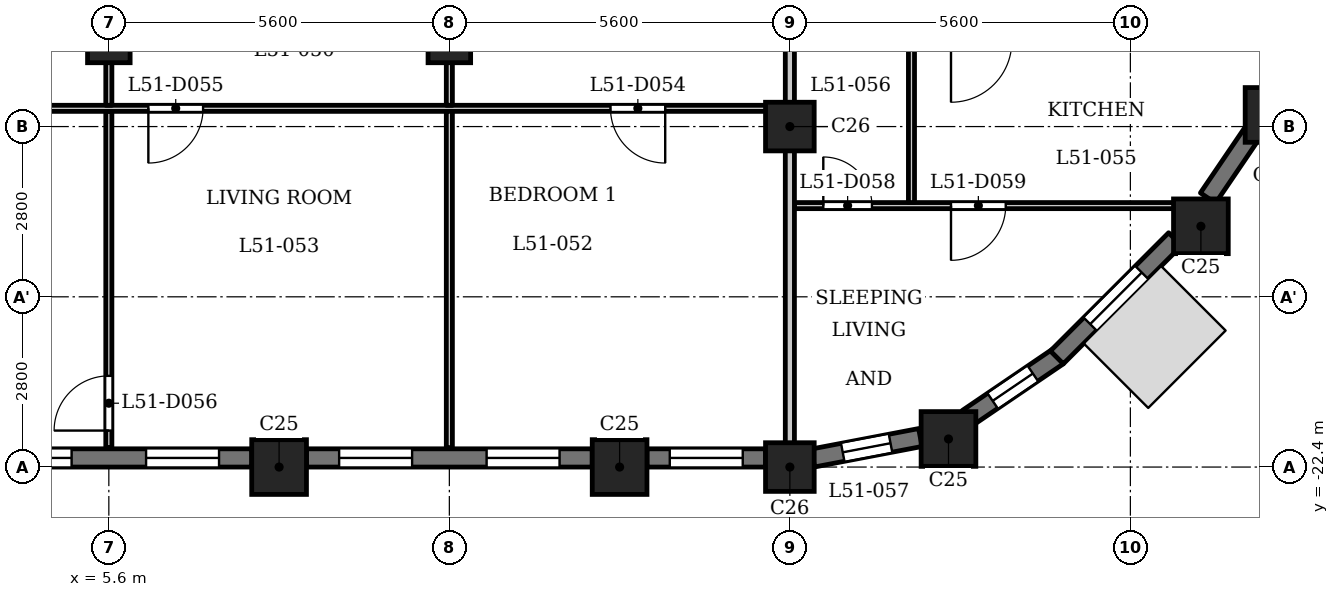
"""IFC4 building model, lengths in metres.
Left out: names, types, materials, properties, quantities, classifications, styles, units other than length and angle.
Written with IfcOpenShell. Run it as: python <this file> out.ifc"""

import sys

from ifc_helpers import new_model, si_unit, direction, frame, frame_2d, origin, origin_2d, place, context, subcontext, project, spatial, rectangle, extrude, element, fill, save


model = new_model("IFC4")
c1 = context("Model", 3, precision=1e-05, world=origin(), true_north=direction((0.0, 1.0)))
c2 = subcontext(c1, "Body", "Model", "MODEL_VIEW")
j1 = project(units=[si_unit("LENGTHUNIT", "METRE"), si_unit("PLANEANGLEUNIT", "RADIAN")], contexts=[c1])
p1 = place(None, origin())
s1 = spatial("IfcSite", under=j1, at=p1, CompositionType="ELEMENT")
p2 = place(p1, origin())
s2 = spatial("IfcBuilding", under=s1, at=p2, CompositionType="ELEMENT")
p3 = place(p2, frame((0.0, 0.0, 199.4)))
s3 = spatial("IfcBuildingStorey", under=s2, at=p3, CompositionType="ELEMENT", Elevation=199.4)
for number, where, z_axis, x_axis in (
    (1, (8.4, -22.4, 0.0), (0.0, 0.0, 1.0), (1.0, 0.0, 0.0)),
    (2, (14.0, -22.4, 0.0), (0.0, 0.0, 1.0), (1.0, 0.0, 0.0)),
    (3, (19.409, -21.938, 0.0), (0.0, 0.0, 1.0), (1.0, 0.0, 0.0)),
    (4, (23.56, -18.44, 0.0), (0.0, 0.0, 1.0), (1.0, 0.0, 0.0)),
    (5, (24.738, -16.609, 0.0), (0.0, 0.0, 1.0), (1.0, 0.0, 0.0)),
):
    element("IfcColumn", number, at=place(p3, frame(where, z_axis=z_axis, x_axis=x_axis)), inside=s3, PredefinedType="COLUMN", context=c2, shape_type="SweptSolid", body=[
        extrude(rectangle(XDim=0.9, YDim=0.9, at=origin_2d()), origin(), (0.0, 0.0, 1.0), 3.5),
    ])
for number, where, z_axis, x_axis in (
    (6, (16.8, -22.4, 0.0), (0.0, 0.0, 1.0), (1.0, 0.0, 0.0)),
    (7, (16.8, -16.8, 0.0), (0.0, 0.0, 1.0), (1.0, 0.0, 0.0)),
):
    element("IfcColumn", number, at=place(p3, frame(where, z_axis=z_axis, x_axis=x_axis)), inside=s3, PredefinedType="COLUMN", context=c2, shape_type="SweptSolid", body=[
        extrude(rectangle(XDim=0.8, YDim=0.8, at=origin_2d()), origin(), (0.0, 0.0, 1.0), 3.5),
    ])
for number, where, z_axis, x_axis in (
    (8, (5.6, -15.4, 0.0), (0.0, 0.0, 1.0), (1.0, 0.0, 0.0)),
    (9, (11.2, -15.4, 0.0), (0.0, 0.0, 1.0), (1.0, 0.0, 0.0)),
):
    element("IfcColumn", number, at=place(p3, frame(where, z_axis=z_axis, x_axis=x_axis)), inside=s3, PredefinedType="COLUMN", context=c2, shape_type="SweptSolid", body=[
        extrude(rectangle(XDim=0.7, YDim=0.7, at=origin_2d()), origin(), (0.0, 0.0, 1.0), 3.5),
    ])
p4 = place(p3, frame((3.25, -22.25, 0.0), z_axis=(0.0, 0.0, 1.0), x_axis=(1.0, 0.0, 0.0)))
e10 = element("IfcWall", 10, at=p4, inside=s3, PredefinedType="SOLIDWALL", context=c2, shape_type="SweptSolid", body=[
    extrude(rectangle(XDim=4.7, YDim=0.3, at=frame_2d((2.35, 0.0))), origin(), (0.0, 0.0, 1.0), 2.5),
])
p5 = place(p4, frame((0.538, 0.0, 0.6)))
e11 = element("IfcOpeningElement", 11, at=p5, cuts=e10, PredefinedType="OPENING", context=c2, shape_type="SweptSolid", body=[
    extrude(rectangle(XDim=1.2, YDim=1.55, at=frame_2d((0.6, 0.775))), frame((0.0, 0.16, 0.0), z_axis=(0.0, -1.0, 0.0), x_axis=(1.0, 0.0, 0.0)), (0.0, 0.0, 1.0), 0.32),
])
p6 = place(p4, frame((2.962, 0.0, 0.6)))
e12 = element("IfcOpeningElement", 12, at=p6, cuts=e10, PredefinedType="OPENING", context=c2, shape_type="SweptSolid", body=[
    extrude(rectangle(XDim=1.2, YDim=1.55, at=frame_2d((0.6, 0.775))), frame((0.0, 0.16, 0.0), z_axis=(0.0, -1.0, 0.0), x_axis=(1.0, 0.0, 0.0)), (0.0, 0.0, 1.0), 0.32),
])
p7 = place(p3, frame((8.85, -22.25, 0.0), z_axis=(0.0, 0.0, 1.0), x_axis=(1.0, 0.0, 0.0)))
e13 = element("IfcWall", 13, at=p7, inside=s3, PredefinedType="SOLIDWALL", context=c2, shape_type="SweptSolid", body=[
    extrude(rectangle(XDim=4.7, YDim=0.3, at=frame_2d((2.35, 0.0))), origin(), (0.0, 0.0, 1.0), 2.5),
])
p8 = place(p7, frame((0.538, 0.0, 0.6)))
e14 = element("IfcOpeningElement", 14, at=p8, cuts=e13, PredefinedType="OPENING", context=c2, shape_type="SweptSolid", body=[
    extrude(rectangle(XDim=1.2, YDim=1.55, at=frame_2d((0.6, 0.775))), frame((0.0, 0.16, 0.0), z_axis=(0.0, -1.0, 0.0), x_axis=(1.0, 0.0, 0.0)), (0.0, 0.0, 1.0), 0.32),
])
p9 = place(p7, frame((2.962, 0.0, 0.6)))
e15 = element("IfcOpeningElement", 15, at=p9, cuts=e13, PredefinedType="OPENING", context=c2, shape_type="SweptSolid", body=[
    extrude(rectangle(XDim=1.2, YDim=1.55, at=frame_2d((0.6, 0.775))), frame((0.0, 0.16, 0.0), z_axis=(0.0, -1.0, 0.0), x_axis=(1.0, 0.0, 0.0)), (0.0, 0.0, 1.0), 0.32),
])
p10 = place(p3, frame((14.45, -22.25, 0.0), z_axis=(0.0, 0.0, 1.0), x_axis=(1.0, 0.0, 0.0)))
e16 = element("IfcWall", 16, at=p10, inside=s3, PredefinedType="SOLIDWALL", context=c2, shape_type="SweptSolid", body=[
    extrude(rectangle(XDim=1.95, YDim=0.3, at=frame_2d((0.975, 0.0))), origin(), (0.0, 0.0, 1.0), 2.5),
])
p11 = place(p10, frame((0.375, 0.0, 0.6)))
e17 = element("IfcOpeningElement", 17, at=p11, cuts=e16, PredefinedType="OPENING", context=c2, shape_type="SweptSolid", body=[
    extrude(rectangle(XDim=1.2, YDim=1.55, at=frame_2d((0.6, 0.775))), frame((0.0, 0.16, 0.0), z_axis=(0.0, -1.0, 0.0), x_axis=(1.0, 0.0, 0.0)), (0.0, 0.0, 1.0), 0.32),
])
p12 = place(p3, frame((17.179, -22.251, 0.0), z_axis=(0.0, 0.0, 1.0), x_axis=(0.98230529033, 0.187286722942, 0.0)))
e18 = element("IfcWall", 18, at=p12, inside=s3, PredefinedType="SOLIDWALL", context=c2, shape_type="SweptSolid", body=[
    extrude(rectangle(XDim=1.799, YDim=0.3, at=frame_2d((0.899, 0.0))), origin(), (0.0, 0.0, 1.0), 2.5),
])
p13 = place(p12, frame((0.5, 0.0, 0.6)))
e19 = element("IfcOpeningElement", 19, at=p13, cuts=e18, PredefinedType="OPENING", context=c2, shape_type="SweptSolid", body=[
    extrude(rectangle(XDim=0.8, YDim=1.55, at=frame_2d((0.4, 0.775))), frame((0.0, 0.16, 0.0), z_axis=(0.0, -1.0, 0.0), x_axis=(1.0, 0.0, 0.0)), (0.0, 0.0, 1.0), 0.32),
])
p14 = place(p3, frame((19.719, -21.594, 0.0), z_axis=(0.0, 0.0, 1.0), x_axis=(0.827067282455, 0.562102935673, 0.0)))
e20 = element("IfcWall", 20, at=p14, inside=s3, PredefinedType="SOLIDWALL", context=c2, shape_type="SweptSolid", body=[
    extrude(rectangle(XDim=1.806, YDim=0.3, at=frame_2d((0.903, 0.0))), origin(), (0.0, 0.0, 1.0), 2.5),
])
p15 = place(p14, frame((0.503, 0.0, 0.6)))
e21 = element("IfcOpeningElement", 21, at=p15, cuts=e20, PredefinedType="OPENING", context=c2, shape_type="SweptSolid", body=[
    extrude(rectangle(XDim=0.8, YDim=1.55, at=frame_2d((0.4, 0.775))), frame((0.0, 0.16, 0.0), z_axis=(0.0, -1.0, 0.0), x_axis=(1.0, 0.0, 0.0)), (0.0, 0.0, 1.0), 0.32),
])
p16 = place(p3, frame((21.191, -20.597, 0.0), z_axis=(0.0, 0.0, 1.0), x_axis=(0.707106781187, 0.707106781187, 0.0)))
e22 = element("IfcWall", 22, at=p16, inside=s3, PredefinedType="SOLIDWALL", context=c2, shape_type="SweptSolid", body=[
    extrude(rectangle(XDim=2.75, YDim=0.3, at=frame_2d((1.375, 0.0))), origin(), (0.0, 0.0, 1.0), 2.5),
])
p17 = place(p16, frame((0.775, 0.0, 0.6)))
e23 = element("IfcOpeningElement", 23, at=p17, cuts=e22, PredefinedType="OPENING", context=c2, shape_type="SweptSolid", body=[
    extrude(rectangle(XDim=1.2, YDim=1.55, at=frame_2d((0.6, 0.775))), frame((0.0, 0.16, 0.0), z_axis=(0.0, -1.0, 0.0), x_axis=(1.0, 0.0, 0.0)), (0.0, 0.0, 1.0), 0.32),
])
p18 = place(p3, frame((23.676, -17.975, 0.0), z_axis=(0.0, 0.0, 1.0), x_axis=(0.56200149592, 0.827136215253, 0.0)))
e24 = element("IfcWall", 24, at=p18, inside=s3, PredefinedType="SOLIDWALL", context=c2, shape_type="SweptSolid", body=[
    extrude(rectangle(XDim=1.277, YDim=0.3, at=frame_2d((0.639, 0.0))), origin(), (0.0, 0.0, 1.0), 2.5),
])
p19 = place(p3, frame((16.875, -18.1, 0.0), z_axis=(0.0, 0.0, 1.0), x_axis=(1.0, 0.0, 0.0)))
e25 = element("IfcWall", 25, at=p19, inside=s3, PredefinedType="PARTITIONING", context=c2, shape_type="SweptSolid", body=[
    extrude(rectangle(XDim=6.765, YDim=0.1, at=frame_2d((3.382, 0.0))), origin(), (0.0, 0.0, 1.0), 3.2),
])
p20 = place(p19, frame((0.475, 0.0, 0.0)))
e26 = element("IfcOpeningElement", 26, at=p20, cuts=e25, PredefinedType="OPENING", context=c2, shape_type="SweptSolid", body=[
    extrude(rectangle(XDim=0.8, YDim=2.1, at=frame_2d((0.4, 1.05))), frame((0.0, 0.06, 0.0), z_axis=(0.0, -1.0, 0.0), x_axis=(1.0, 0.0, 0.0)), (0.0, 0.0, 1.0), 0.12),
])
p21 = place(p19, frame((2.575, 0.0, 0.0)))
e27 = element("IfcOpeningElement", 27, at=p21, cuts=e25, PredefinedType="OPENING", context=c2, shape_type="SweptSolid", body=[
    extrude(rectangle(XDim=0.9, YDim=2.1, at=frame_2d((0.45, 1.05))), frame((0.0, 0.06, 0.0), z_axis=(0.0, -1.0, 0.0), x_axis=(1.0, 0.0, 0.0)), (0.0, 0.0, 1.0), 0.12),
])
p22 = place(p3, frame((-16.725, -16.5, 0.0), z_axis=(0.0, 0.0, 1.0), x_axis=(1.0, 0.0, 0.0)))
e28 = element("IfcWall", 28, at=p22, inside=s3, PredefinedType="PARTITIONING", context=c2, shape_type="SweptSolid", body=[
    extrude(rectangle(XDim=33.45, YDim=0.1, at=frame_2d((16.725, 0.0))), origin(), (0.0, 0.0, 1.0), 3.2),
])
p23 = place(p22, frame((4.075, 0.0, 0.0)))
e29 = element("IfcOpeningElement", 29, at=p23, cuts=e28, PredefinedType="OPENING", context=c2, shape_type="SweptSolid", body=[
    extrude(rectangle(XDim=0.9, YDim=2.1, at=frame_2d((0.45, 1.05))), frame((0.0, 0.06, 0.0), z_axis=(0.0, -1.0, 0.0), x_axis=(1.0, 0.0, 0.0)), (0.0, 0.0, 1.0), 0.12),
])
p24 = place(p22, frame((6.175, 0.0, 0.0)))
e30 = element("IfcOpeningElement", 30, at=p24, cuts=e28, PredefinedType="OPENING", context=c2, shape_type="SweptSolid", body=[
    extrude(rectangle(XDim=0.9, YDim=2.1, at=frame_2d((0.45, 1.05))), frame((0.0, 0.06, 0.0), z_axis=(0.0, -1.0, 0.0), x_axis=(1.0, 0.0, 0.0)), (0.0, 0.0, 1.0), 0.12),
])
p25 = place(p22, frame((30.575, 0.0, 0.0)))
e31 = element("IfcOpeningElement", 31, at=p25, cuts=e28, PredefinedType="OPENING", context=c2, shape_type="SweptSolid", body=[
    extrude(rectangle(XDim=0.9, YDim=2.1, at=frame_2d((0.45, 1.05))), frame((0.0, 0.06, 0.0), z_axis=(0.0, -1.0, 0.0), x_axis=(1.0, 0.0, 0.0)), (0.0, 0.0, 1.0), 0.12),
])
p26 = place(p22, frame((22.975, 0.0, 0.0)))
e32 = element("IfcOpeningElement", 32, at=p26, cuts=e28, PredefinedType="OPENING", context=c2, shape_type="SweptSolid", body=[
    extrude(rectangle(XDim=0.9, YDim=2.1, at=frame_2d((0.45, 1.05))), frame((0.0, 0.06, 0.0), z_axis=(0.0, -1.0, 0.0), x_axis=(1.0, 0.0, 0.0)), (0.0, 0.0, 1.0), 0.12),
])
p27 = place(p3, frame((5.6, -22.08, 0.0), z_axis=(0.0, 0.0, 1.0), x_axis=(0.0, 1.0, 0.0)))
e33 = element("IfcWall", 33, at=p27, inside=s3, PredefinedType="PARTITIONING", context=c2, shape_type="SweptSolid", body=[
    extrude(rectangle(XDim=5.53, YDim=0.1, at=frame_2d((2.765, 0.0))), origin(), (0.0, 0.0, 1.0), 3.2),
])
p28 = place(p27, frame((0.28, 0.0, 0.0)))
e34 = element("IfcOpeningElement", 34, at=p28, cuts=e33, PredefinedType="OPENING", context=c2, shape_type="SweptSolid", body=[
    extrude(rectangle(XDim=0.9, YDim=2.1, at=frame_2d((0.45, 1.05))), frame((0.0, 0.06, 0.0), z_axis=(0.0, -1.0, 0.0), x_axis=(1.0, 0.0, 0.0)), (0.0, 0.0, 1.0), 0.12),
])
p29 = place(p3, frame((5.6, -16.45, 0.0), z_axis=(0.0, 0.0, 1.0), x_axis=(0.0, 1.0, 0.0)))
e35 = element("IfcWall", 35, at=p29, inside=s3, PredefinedType="PARTITIONING", context=c2, shape_type="SweptSolid", body=[
    extrude(rectangle(XDim=3.175, YDim=0.1, at=frame_2d((1.587, 0.0))), origin(), (0.0, 0.0, 1.0), 3.2),
])
p30 = place(p29, frame((1.799, 0.0, 0.0)))
e36 = element("IfcOpeningElement", 36, at=p30, cuts=e35, PredefinedType="OPENING", context=c2, shape_type="SweptSolid", body=[
    extrude(rectangle(XDim=0.8, YDim=2.1, at=frame_2d((0.4, 1.05))), frame((0.0, 0.06, 0.0), z_axis=(0.0, -1.0, 0.0), x_axis=(1.0, 0.0, 0.0)), (0.0, 0.0, 1.0), 0.12),
])
p31 = place(p3, frame((11.2, -22.08, 0.0), z_axis=(0.0, 0.0, 1.0), x_axis=(0.0, 1.0, 0.0)))
e37 = element("IfcWall", 37, at=p31, inside=s3, PredefinedType="PARTITIONING", context=c2, shape_type="SweptSolid", body=[
    extrude(rectangle(XDim=5.53, YDim=0.1, at=frame_2d((2.765, 0.0))), origin(), (0.0, 0.0, 1.0), 3.2),
])
p32 = place(p3, frame((11.2, -16.45, 0.0), z_axis=(0.0, 0.0, 1.0), x_axis=(0.0, 1.0, 0.0)))
e38 = element("IfcWall", 38, at=p32, inside=s3, PredefinedType="PARTITIONING", context=c2, shape_type="SweptSolid", body=[
    extrude(rectangle(XDim=3.175, YDim=0.1, at=frame_2d((1.587, 0.0))), origin(), (0.0, 0.0, 1.0), 3.2),
])
p33 = place(p32, frame((1.699, 0.0, 0.0)))
e39 = element("IfcOpeningElement", 39, at=p33, cuts=e38, PredefinedType="OPENING", context=c2, shape_type="SweptSolid", body=[
    extrude(rectangle(XDim=0.9, YDim=2.1, at=frame_2d((0.45, 1.05))), frame((0.0, 0.06, 0.0), z_axis=(0.0, -1.0, 0.0), x_axis=(1.0, 0.0, 0.0)), (0.0, 0.0, 1.0), 0.12),
])
p34 = place(p3, frame((16.8, -22.31, 0.0), z_axis=(0.0, 0.0, 1.0), x_axis=(0.0, 1.0, 0.0)))
e40 = element("IfcWall", 40, at=p34, inside=s3, PredefinedType="PARTITIONING", context=c2, shape_type="SweptSolid", body=[
    extrude(rectangle(XDim=6.835, YDim=0.15, at=frame_2d((3.417, 0.0))), origin(), (0.0, 0.0, 1.0), 2.55),
])
p35 = place(p3, frame((18.8, -18.05, 0.0), z_axis=(0.0, 0.0, 1.0), x_axis=(0.0, 1.0, 0.0)))
e41 = element("IfcWall", 41, at=p35, inside=s3, PredefinedType="PARTITIONING", context=c2, shape_type="SweptSolid", body=[
    extrude(rectangle(XDim=2.575, YDim=0.1, at=frame_2d((1.288, 0.0))), origin(), (0.0, 0.0, 1.0), 3.2),
])
p36 = place(p25, origin())
e42 = element("IfcDoor", 42, at=p36, inside=s3, OperationType="SINGLE_SWING_RIGHT", PredefinedType="DOOR", context=c2, shape_type="SweptSolid", body=[
    extrude(rectangle(XDim=0.9, YDim=2.1, at=frame_2d((0.45, 1.05))), frame((0.0, 0.025, 0.0), z_axis=(0.0, -1.0, 0.0), x_axis=(1.0, 0.0, 0.0)), (0.0, 0.0, 1.0), 0.05),
])
fill(e31, e42)
p37 = place(p26, origin())
e43 = element("IfcDoor", 43, at=p37, inside=s3, OperationType="SINGLE_SWING_LEFT", PredefinedType="DOOR", context=c2, shape_type="SweptSolid", body=[
    extrude(rectangle(XDim=0.9, YDim=2.1, at=frame_2d((0.45, 1.05))), frame((0.0, 0.025, 0.0), z_axis=(0.0, -1.0, 0.0), x_axis=(1.0, 0.0, 0.0)), (0.0, 0.0, 1.0), 0.05),
])
fill(e32, e43)
p38 = place(p28, origin())
e44 = element("IfcDoor", 44, at=p38, inside=s3, OperationType="SINGLE_SWING_RIGHT", PredefinedType="DOOR", context=c2, shape_type="SweptSolid", body=[
    extrude(rectangle(XDim=0.9, YDim=2.1, at=frame_2d((0.45, 1.05))), frame((0.0, 0.025, 0.0), z_axis=(0.0, -1.0, 0.0), x_axis=(1.0, 0.0, 0.0)), (0.0, 0.0, 1.0), 0.05),
])
fill(e34, e44)
p39 = place(p20, origin())
e45 = element("IfcDoor", 45, at=p39, inside=s3, OperationType="SINGLE_SWING_RIGHT", PredefinedType="DOOR", context=c2, shape_type="SweptSolid", body=[
    extrude(rectangle(XDim=0.8, YDim=2.1, at=frame_2d((0.4, 1.05))), frame((0.0, 0.025, 0.0), z_axis=(0.0, -1.0, 0.0), x_axis=(1.0, 0.0, 0.0)), (0.0, 0.0, 1.0), 0.05),
])
fill(e26, e45)
p40 = place(p21, origin())
e46 = element("IfcDoor", 46, at=p40, inside=s3, OperationType="SINGLE_SWING_LEFT", PredefinedType="DOOR", context=c2, shape_type="SweptSolid", body=[
    extrude(rectangle(XDim=0.9, YDim=2.1, at=frame_2d((0.45, 1.05))), frame((0.0, 0.025, 0.0), z_axis=(0.0, -1.0, 0.0), x_axis=(1.0, 0.0, 0.0)), (0.0, 0.0, 1.0), 0.05),
])
fill(e27, e46)
p41 = place(p5, origin())
e47 = element("IfcWindow", 47, at=p41, inside=s3, PartitioningType="SINGLE_PANEL", PredefinedType="WINDOW", context=c2, shape_type="SweptSolid", body=[
    extrude(rectangle(XDim=1.2, YDim=1.55, at=frame_2d((0.6, 0.775))), frame((0.0, 0.03, 0.0), z_axis=(0.0, -1.0, 0.0), x_axis=(1.0, 0.0, 0.0)), (0.0, 0.0, 1.0), 0.06),
])
fill(e11, e47)
p42 = place(p6, origin())
e48 = element("IfcWindow", 48, at=p42, inside=s3, PartitioningType="SINGLE_PANEL", PredefinedType="WINDOW", context=c2, shape_type="SweptSolid", body=[
    extrude(rectangle(XDim=1.2, YDim=1.55, at=frame_2d((0.6, 0.775))), frame((0.0, 0.03, 0.0), z_axis=(0.0, -1.0, 0.0), x_axis=(1.0, 0.0, 0.0)), (0.0, 0.0, 1.0), 0.06),
])
fill(e12, e48)
p43 = place(p8, origin())
e49 = element("IfcWindow", 49, at=p43, inside=s3, PartitioningType="SINGLE_PANEL", PredefinedType="WINDOW", context=c2, shape_type="SweptSolid", body=[
    extrude(rectangle(XDim=1.2, YDim=1.55, at=frame_2d((0.6, 0.775))), frame((0.0, 0.03, 0.0), z_axis=(0.0, -1.0, 0.0), x_axis=(1.0, 0.0, 0.0)), (0.0, 0.0, 1.0), 0.06),
])
fill(e14, e49)
p44 = place(p9, origin())
e50 = element("IfcWindow", 50, at=p44, inside=s3, PartitioningType="SINGLE_PANEL", PredefinedType="WINDOW", context=c2, shape_type="SweptSolid", body=[
    extrude(rectangle(XDim=1.2, YDim=1.55, at=frame_2d((0.6, 0.775))), frame((0.0, 0.03, 0.0), z_axis=(0.0, -1.0, 0.0), x_axis=(1.0, 0.0, 0.0)), (0.0, 0.0, 1.0), 0.06),
])
fill(e15, e50)
p45 = place(p11, origin())
e51 = element("IfcWindow", 51, at=p45, inside=s3, PartitioningType="SINGLE_PANEL", PredefinedType="WINDOW", context=c2, shape_type="SweptSolid", body=[
    extrude(rectangle(XDim=1.2, YDim=1.55, at=frame_2d((0.6, 0.775))), frame((0.0, 0.03, 0.0), z_axis=(0.0, -1.0, 0.0), x_axis=(1.0, 0.0, 0.0)), (0.0, 0.0, 1.0), 0.06),
])
fill(e17, e51)
p46 = place(p13, origin())
e52 = element("IfcWindow", 52, at=p46, inside=s3, PartitioningType="SINGLE_PANEL", PredefinedType="WINDOW", context=c2, shape_type="SweptSolid", body=[
    extrude(rectangle(XDim=0.8, YDim=1.55, at=frame_2d((0.4, 0.775))), frame((0.0, 0.03, 0.0), z_axis=(0.0, -1.0, 0.0), x_axis=(1.0, 0.0, 0.0)), (0.0, 0.0, 1.0), 0.06),
])
fill(e19, e52)
p47 = place(p15, origin())
e53 = element("IfcWindow", 53, at=p47, inside=s3, PartitioningType="SINGLE_PANEL", PredefinedType="WINDOW", context=c2, shape_type="SweptSolid", body=[
    extrude(rectangle(XDim=0.8, YDim=1.55, at=frame_2d((0.4, 0.775))), frame((0.0, 0.03, 0.0), z_axis=(0.0, -1.0, 0.0), x_axis=(1.0, 0.0, 0.0)), (0.0, 0.0, 1.0), 0.06),
])
fill(e21, e53)
p48 = place(p17, origin())
e54 = element("IfcWindow", 54, at=p48, inside=s3, PartitioningType="SINGLE_PANEL", PredefinedType="WINDOW", context=c2, shape_type="SweptSolid", body=[
    extrude(rectangle(XDim=1.2, YDim=1.55, at=frame_2d((0.6, 0.775))), frame((0.0, 0.03, 0.0), z_axis=(0.0, -1.0, 0.0), x_axis=(1.0, 0.0, 0.0)), (0.0, 0.0, 1.0), 0.06),
])
fill(e23, e54)
save(model, sys.argv[1])
